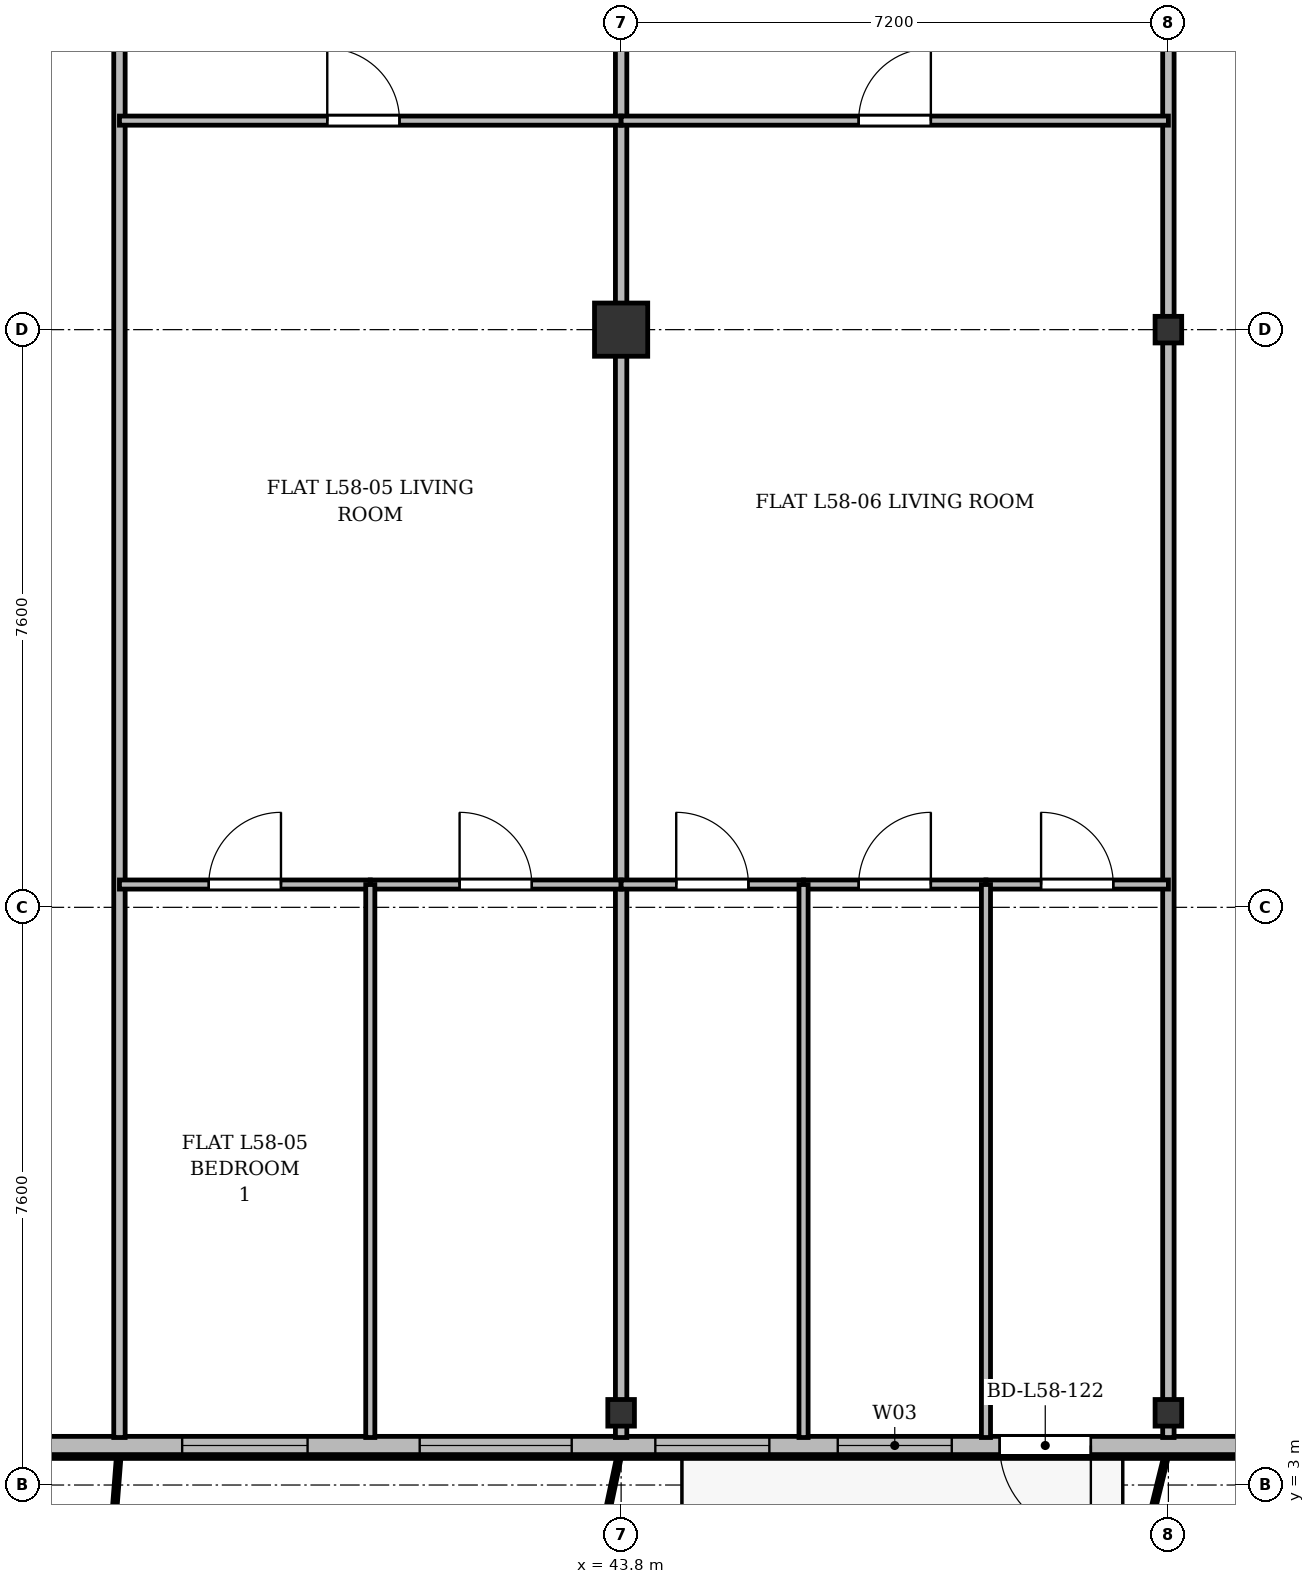
"""IFC4 building model, lengths in metres.
Left out: names, types, materials, properties, quantities, classifications, styles, units other than length and angle.
Written with IfcOpenShell. Run it as: python <this file> out.ifc"""

import sys

from ifc_helpers import new_model, si_unit, direction, frame, frame_2d, origin, origin_2d, place, context, subcontext, project, spatial, rectangle, i_section, extrude, source, transform, mapped, element, fill, save


model = new_model("IFC4")
c1 = context("Model", 3, precision=1e-05, world=origin(), true_north=direction((0.0, 1.0)))
c2 = subcontext(c1, "Body", "Model", "MODEL_VIEW")
j1 = project(units=[si_unit("LENGTHUNIT", "METRE"), si_unit("PLANEANGLEUNIT", "RADIAN")], contexts=[c1])
p1 = place(None, origin())
s1 = spatial("IfcSite", under=j1, at=p1, CompositionType="ELEMENT")
p2 = place(p1, origin())
s2 = spatial("IfcBuilding", under=s1, at=p2, CompositionType="ELEMENT")
p3 = place(p2, frame((0.0, 0.0, 222.9)))
s3 = spatial("IfcBuildingStorey", under=s2, at=p3, CompositionType="ELEMENT", Elevation=222.9)
m1 = source(origin(), c2, "Body", "SweptSolid", [
    extrude(i_section(OverallWidth=0.35, OverallDepth=0.35, WebThickness=0.018, FlangeThickness=0.028, at=origin_2d()), origin(), (0.0, 0.0, 1.0), 3.6),
])
p4 = place(p3, frame((43.8, 3.95, 0.0), z_axis=(0.0, 0.0, 1.0), x_axis=(1.0, 0.0, 0.0)))
e1 = element("IfcColumn", 1, at=p4, inside=s3, PredefinedType="COLUMN", context=c2, shape_type="MappedRepresentation", body=[
    mapped(m1, transform((0.0, 0.0, 0.0), x_axis=(1.0, 0.0, 0.0), y_axis=(0.0, 1.0, 0.0), z_axis=(0.0, 0.0, 1.0), scale=1.0)),
])
m2 = source(origin(), c2, "Body", "SweptSolid", [
    extrude(rectangle(XDim=0.7, YDim=0.7, at=origin_2d()), origin(), (0.0, 0.0, 1.0), 3.6),
])
p5 = place(p3, frame((43.8, 18.2, 0.0), z_axis=(0.0, 0.0, 1.0), x_axis=(1.0, 0.0, 0.0)))
e2 = element("IfcColumn", 2, at=p5, inside=s3, PredefinedType="COLUMN", context=c2, shape_type="MappedRepresentation", body=[
    mapped(m2, transform((0.0, 0.0, 0.0), x_axis=(1.0, 0.0, 0.0), y_axis=(0.0, 1.0, 0.0), z_axis=(0.0, 0.0, 1.0), scale=1.0)),
])
for number, where, z_axis, x_axis in (
    (3, (51.0, 3.95, 0.0), (0.0, 0.0, 1.0), (1.0, 0.0, 0.0)),
    (4, (51.0, 18.2, 0.0), (0.0, 0.0, 1.0), (1.0, 0.0, 0.0)),
):
    element("IfcColumn", number, at=place(p3, frame(where, z_axis=z_axis, x_axis=x_axis)), inside=s3, PredefinedType="COLUMN", context=c2, shape_type="MappedRepresentation", body=[
        mapped(m1, transform((0.0, 0.0, 0.0), x_axis=(1.0, 0.0, 0.0), y_axis=(0.0, 1.0, 0.0), z_axis=(0.0, 0.0, 1.0), scale=1.0)),
    ])
p6 = place(p3, frame((63.4, 3.52, 0.0), z_axis=(0.0, 0.0, 1.0), x_axis=(-1.0, 0.0, 0.0)))
e5 = element("IfcWall", 5, at=p6, inside=s3, PredefinedType="SOLIDWALL", context=c2, shape_type="SweptSolid", body=[
    extrude(rectangle(XDim=52.4, YDim=0.24, at=frame_2d((26.2, 0.0))), origin(), (0.0, 0.0, 1.0), 3.36),
])
p7 = place(p6, frame((1.345, 0.0, 0.9)))
e6 = element("IfcOpeningElement", 6, at=p7, cuts=e5, PredefinedType="OPENING", context=c2, shape_type="SweptSolid", body=[
    extrude(rectangle(XDim=2.0, YDim=1.95, at=frame_2d((1.0, 0.975))), frame((0.0, 0.13, 0.0), z_axis=(0.0, -1.0, 0.0), x_axis=(1.0, 0.0, 0.0)), (0.0, 0.0, 1.0), 0.26),
])
p8 = place(p6, frame((7.675, 0.0, 0.9)))
e7 = element("IfcOpeningElement", 7, at=p8, cuts=e5, PredefinedType="OPENING", context=c2, shape_type="SweptSolid", body=[
    extrude(rectangle(XDim=1.65, YDim=1.85, at=frame_2d((0.825, 0.925))), frame((0.0, 0.13, 0.0), z_axis=(0.0, -1.0, 0.0), x_axis=(1.0, 0.0, 0.0)), (0.0, 0.0, 1.0), 0.26),
])
p9 = place(p6, frame((13.42, 0.0, 0.0)))
e8 = element("IfcOpeningElement", 8, at=p9, cuts=e5, PredefinedType="OPENING", context=c2, shape_type="SweptSolid", body=[
    extrude(rectangle(XDim=1.2, YDim=2.2, at=frame_2d((0.6, 1.1))), frame((0.0, 0.13, 0.0), z_axis=(0.0, -1.0, 0.0), x_axis=(1.0, 0.0, 0.0)), (0.0, 0.0, 1.0), 0.26),
])
p10 = place(p6, frame((15.25, 0.0, 0.9)))
e9 = element("IfcOpeningElement", 9, at=p10, cuts=e5, PredefinedType="OPENING", context=c2, shape_type="SweptSolid", body=[
    extrude(rectangle(XDim=1.5, YDim=1.75, at=frame_2d((0.75, 0.875))), frame((0.0, 0.13, 0.0), z_axis=(0.0, -1.0, 0.0), x_axis=(1.0, 0.0, 0.0)), (0.0, 0.0, 1.0), 0.26),
])
p11 = place(p6, frame((17.65, 0.0, 0.9)))
e10 = element("IfcOpeningElement", 10, at=p11, cuts=e5, PredefinedType="OPENING", context=c2, shape_type="SweptSolid", body=[
    extrude(rectangle(XDim=1.5, YDim=1.75, at=frame_2d((0.75, 0.875))), frame((0.0, 0.13, 0.0), z_axis=(0.0, -1.0, 0.0), x_axis=(1.0, 0.0, 0.0)), (0.0, 0.0, 1.0), 0.26),
])
p12 = place(p6, frame((20.25, 0.0, 0.9)))
e11 = element("IfcOpeningElement", 11, at=p12, cuts=e5, PredefinedType="OPENING", context=c2, shape_type="SweptSolid", body=[
    extrude(rectangle(XDim=2.0, YDim=1.95, at=frame_2d((1.0, 0.975))), frame((0.0, 0.13, 0.0), z_axis=(0.0, -1.0, 0.0), x_axis=(1.0, 0.0, 0.0)), (0.0, 0.0, 1.0), 0.26),
])
p13 = place(p6, frame((23.725, 0.0, 0.9)))
e12 = element("IfcOpeningElement", 12, at=p13, cuts=e5, PredefinedType="OPENING", context=c2, shape_type="SweptSolid", body=[
    extrude(rectangle(XDim=1.65, YDim=1.85, at=frame_2d((0.825, 0.925))), frame((0.0, 0.13, 0.0), z_axis=(0.0, -1.0, 0.0), x_axis=(1.0, 0.0, 0.0)), (0.0, 0.0, 1.0), 0.26),
])
p14 = place(p6, frame((28.6, 0.0, 0.9)))
e13 = element("IfcOpeningElement", 13, at=p14, cuts=e5, PredefinedType="OPENING", context=c2, shape_type="SweptSolid", body=[
    extrude(rectangle(XDim=1.8, YDim=1.8, at=frame_2d((0.9, 0.9))), frame((0.0, 0.13, 0.0), z_axis=(0.0, -1.0, 0.0), x_axis=(1.0, 0.0, 0.0)), (0.0, 0.0, 1.0), 0.26),
])
p15 = place(p6, frame((33.5, 0.0, 0.9)))
e14 = element("IfcOpeningElement", 14, at=p15, cuts=e5, PredefinedType="OPENING", context=c2, shape_type="SweptSolid", body=[
    extrude(rectangle(XDim=2.2, YDim=1.8, at=frame_2d((1.1, 0.9))), frame((0.0, 0.13, 0.0), z_axis=(0.0, -1.0, 0.0), x_axis=(1.0, 0.0, 0.0)), (0.0, 0.0, 1.0), 0.26),
])
p16 = place(p6, frame((37.45, 0.0, 0.9)))
e15 = element("IfcOpeningElement", 15, at=p16, cuts=e5, PredefinedType="OPENING", context=c2, shape_type="SweptSolid", body=[
    extrude(rectangle(XDim=1.5, YDim=1.75, at=frame_2d((0.75, 0.875))), frame((0.0, 0.13, 0.0), z_axis=(0.0, -1.0, 0.0), x_axis=(1.0, 0.0, 0.0)), (0.0, 0.0, 1.0), 0.26),
])
p17 = place(p6, frame((41.09, 0.0, 0.0)))
e16 = element("IfcOpeningElement", 16, at=p17, cuts=e5, PredefinedType="OPENING", context=c2, shape_type="SweptSolid", body=[
    extrude(rectangle(XDim=1.2, YDim=2.2, at=frame_2d((0.6, 1.1))), frame((0.0, 0.13, 0.0), z_axis=(0.0, -1.0, 0.0), x_axis=(1.0, 0.0, 0.0)), (0.0, 0.0, 1.0), 0.26),
])
p18 = place(p6, frame((43.075, 0.0, 0.9)))
e17 = element("IfcOpeningElement", 17, at=p18, cuts=e5, PredefinedType="OPENING", context=c2, shape_type="SweptSolid", body=[
    extrude(rectangle(XDim=1.65, YDim=1.85, at=frame_2d((0.825, 0.925))), frame((0.0, 0.13, 0.0), z_axis=(0.0, -1.0, 0.0), x_axis=(1.0, 0.0, 0.0)), (0.0, 0.0, 1.0), 0.26),
])
p19 = place(p6, frame((45.6, 0.0, 0.9)))
e18 = element("IfcOpeningElement", 18, at=p19, cuts=e5, PredefinedType="OPENING", context=c2, shape_type="SweptSolid", body=[
    extrude(rectangle(XDim=1.8, YDim=1.8, at=frame_2d((0.9, 0.9))), frame((0.0, 0.13, 0.0), z_axis=(0.0, -1.0, 0.0), x_axis=(1.0, 0.0, 0.0)), (0.0, 0.0, 1.0), 0.26),
])
p20 = place(p6, frame((48.955, 0.0, 0.9)))
e19 = element("IfcOpeningElement", 19, at=p20, cuts=e5, PredefinedType="OPENING", context=c2, shape_type="SweptSolid", body=[
    extrude(rectangle(XDim=2.2, YDim=1.8, at=frame_2d((1.1, 0.9))), frame((0.0, 0.13, 0.0), z_axis=(0.0, -1.0, 0.0), x_axis=(1.0, 0.0, 0.0)), (0.0, 0.0, 1.0), 0.26),
])
p21 = place(p3, frame((37.2, 3.625, 0.0), z_axis=(0.0, 0.0, 1.0), x_axis=(0.0, 1.0, 0.0)))
e20 = element("IfcWall", 20, at=p21, inside=s3, PredefinedType="PARTITIONING", context=c2, shape_type="SweptSolid", body=[
    extrude(rectangle(XDim=27.375, YDim=0.15, at=frame_2d((13.688, 0.0))), origin(), (0.0, 0.0, 1.0), 2.91),
])
for number, where, z_axis, x_axis in (
    (21, (43.8, 3.625, 0.0), (0.0, 0.0, 1.0), (0.0, 1.0, 0.0)),
    (22, (51.0, 3.625, 0.0), (0.0, 0.0, 1.0), (0.0, 1.0, 0.0)),
):
    element("IfcWall", number, at=place(p3, frame(where, z_axis=z_axis, x_axis=x_axis)), inside=s3, PredefinedType="PARTITIONING", context=c2, shape_type="SweptSolid", body=[
        extrude(rectangle(XDim=27.375, YDim=0.15, at=frame_2d((13.688, 0.0))), origin(), (0.0, 0.0, 1.0), 2.86),
    ])
p22 = place(p3, frame((37.2, 20.95, 0.0), z_axis=(0.0, 0.0, 1.0), x_axis=(1.0, 0.0, 0.0)))
e23 = element("IfcWall", 23, at=p22, inside=s3, PredefinedType="PARTITIONING", context=c2, shape_type="SweptSolid", body=[
    extrude(rectangle(XDim=6.6, YDim=0.12, at=frame_2d((3.3, 0.0))), origin(), (0.0, 0.0, 1.0), 2.86),
])
p23 = place(p22, frame((2.734, 0.0, 0.0)))
e24 = element("IfcOpeningElement", 24, at=p23, cuts=e23, PredefinedType="OPENING", context=c2, shape_type="SweptSolid", body=[
    extrude(rectangle(XDim=0.95, YDim=2.15, at=frame_2d((0.475, 1.075))), frame((0.0, 0.07, 0.0), z_axis=(0.0, -1.0, 0.0), x_axis=(1.0, 0.0, 0.0)), (0.0, 0.0, 1.0), 0.14),
])
p24 = place(p3, frame((37.2, 10.9, 0.0), z_axis=(0.0, 0.0, 1.0), x_axis=(1.0, 0.0, 0.0)))
e25 = element("IfcWall", 25, at=p24, inside=s3, PredefinedType="PARTITIONING", context=c2, shape_type="SweptSolid", body=[
    extrude(rectangle(XDim=3.3, YDim=0.12, at=frame_2d((1.65, 0.0))), origin(), (0.0, 0.0, 1.0), 3.06),
])
p25 = place(p24, frame((1.175, 0.0, 0.0)))
e26 = element("IfcOpeningElement", 26, at=p25, cuts=e25, PredefinedType="OPENING", context=c2, shape_type="SweptSolid", body=[
    extrude(rectangle(XDim=0.95, YDim=2.15, at=frame_2d((0.475, 1.075))), frame((0.0, 0.07, 0.0), z_axis=(0.0, -1.0, 0.0), x_axis=(1.0, 0.0, 0.0)), (0.0, 0.0, 1.0), 0.14),
])
p26 = place(p3, frame((40.5, 10.9, 0.0), z_axis=(0.0, 0.0, 1.0), x_axis=(1.0, 0.0, 0.0)))
e27 = element("IfcWall", 27, at=p26, inside=s3, PredefinedType="PARTITIONING", context=c2, shape_type="SweptSolid", body=[
    extrude(rectangle(XDim=3.3, YDim=0.12, at=frame_2d((1.65, 0.0))), origin(), (0.0, 0.0, 1.0), 2.86),
])
p27 = place(p26, frame((1.175, 0.0, 0.0)))
e28 = element("IfcOpeningElement", 28, at=p27, cuts=e27, PredefinedType="OPENING", context=c2, shape_type="SweptSolid", body=[
    extrude(rectangle(XDim=0.95, YDim=2.15, at=frame_2d((0.475, 1.075))), frame((0.0, 0.07, 0.0), z_axis=(0.0, -1.0, 0.0), x_axis=(1.0, 0.0, 0.0)), (0.0, 0.0, 1.0), 0.14),
])
p28 = place(p3, frame((40.5, 3.625, 0.0), z_axis=(0.0, 0.0, 1.0), x_axis=(0.0, 1.0, 0.0)))
e29 = element("IfcWall", 29, at=p28, inside=s3, PredefinedType="PARTITIONING", context=c2, shape_type="SweptSolid", body=[
    extrude(rectangle(XDim=7.275, YDim=0.12, at=frame_2d((3.637, 0.0))), origin(), (0.0, 0.0, 1.0), 2.91),
])
p29 = place(p3, frame((43.8, 20.95, 0.0), z_axis=(0.0, 0.0, 1.0), x_axis=(1.0, 0.0, 0.0)))
e30 = element("IfcWall", 30, at=p29, inside=s3, PredefinedType="PARTITIONING", context=c2, shape_type="SweptSolid", body=[
    extrude(rectangle(XDim=7.2, YDim=0.12, at=frame_2d((3.6, 0.0))), origin(), (0.0, 0.0, 1.0), 2.86),
])
p30 = place(p29, frame((3.125, 0.0, 0.0)))
e31 = element("IfcOpeningElement", 31, at=p30, cuts=e30, PredefinedType="OPENING", context=c2, shape_type="SweptSolid", body=[
    extrude(rectangle(XDim=0.95, YDim=2.15, at=frame_2d((0.475, 1.075))), frame((0.0, 0.07, 0.0), z_axis=(0.0, -1.0, 0.0), x_axis=(1.0, 0.0, 0.0)), (0.0, 0.0, 1.0), 0.14),
])
p31 = place(p3, frame((43.8, 10.9, 0.0), z_axis=(0.0, 0.0, 1.0), x_axis=(1.0, 0.0, 0.0)))
e32 = element("IfcWall", 32, at=p31, inside=s3, PredefinedType="PARTITIONING", context=c2, shape_type="SweptSolid", body=[
    extrude(rectangle(XDim=2.4, YDim=0.12, at=frame_2d((1.2, 0.0))), origin(), (0.0, 0.0, 1.0), 2.86),
])
p32 = place(p31, frame((0.725, 0.0, 0.0)))
e33 = element("IfcOpeningElement", 33, at=p32, cuts=e32, PredefinedType="OPENING", context=c2, shape_type="SweptSolid", body=[
    extrude(rectangle(XDim=0.95, YDim=2.15, at=frame_2d((0.475, 1.075))), frame((0.0, 0.07, 0.0), z_axis=(0.0, -1.0, 0.0), x_axis=(1.0, 0.0, 0.0)), (0.0, 0.0, 1.0), 0.14),
])
p33 = place(p3, frame((46.2, 10.9, 0.0), z_axis=(0.0, 0.0, 1.0), x_axis=(1.0, 0.0, 0.0)))
e34 = element("IfcWall", 34, at=p33, inside=s3, PredefinedType="PARTITIONING", context=c2, shape_type="SweptSolid", body=[
    extrude(rectangle(XDim=2.4, YDim=0.12, at=frame_2d((1.2, 0.0))), origin(), (0.0, 0.0, 1.0), 3.06),
])
p34 = place(p33, frame((0.725, 0.0, 0.0)))
e35 = element("IfcOpeningElement", 35, at=p34, cuts=e34, PredefinedType="OPENING", context=c2, shape_type="SweptSolid", body=[
    extrude(rectangle(XDim=0.95, YDim=2.15, at=frame_2d((0.475, 1.075))), frame((0.0, 0.07, 0.0), z_axis=(0.0, -1.0, 0.0), x_axis=(1.0, 0.0, 0.0)), (0.0, 0.0, 1.0), 0.14),
])
p35 = place(p3, frame((46.2, 3.625, 0.0), z_axis=(0.0, 0.0, 1.0), x_axis=(0.0, 1.0, 0.0)))
e36 = element("IfcWall", 36, at=p35, inside=s3, PredefinedType="PARTITIONING", context=c2, shape_type="SweptSolid", body=[
    extrude(rectangle(XDim=7.275, YDim=0.12, at=frame_2d((3.637, 0.0))), origin(), (0.0, 0.0, 1.0), 2.91),
])
p36 = place(p3, frame((48.6, 10.9, 0.0), z_axis=(0.0, 0.0, 1.0), x_axis=(1.0, 0.0, 0.0)))
e37 = element("IfcWall", 37, at=p36, inside=s3, PredefinedType="PARTITIONING", context=c2, shape_type="SweptSolid", body=[
    extrude(rectangle(XDim=2.4, YDim=0.12, at=frame_2d((1.2, 0.0))), origin(), (0.0, 0.0, 1.0), 2.86),
])
p37 = place(p36, frame((0.725, 0.0, 0.0)))
e38 = element("IfcOpeningElement", 38, at=p37, cuts=e37, PredefinedType="OPENING", context=c2, shape_type="SweptSolid", body=[
    extrude(rectangle(XDim=0.95, YDim=2.15, at=frame_2d((0.475, 1.075))), frame((0.0, 0.07, 0.0), z_axis=(0.0, -1.0, 0.0), x_axis=(1.0, 0.0, 0.0)), (0.0, 0.0, 1.0), 0.14),
])
p38 = place(p3, frame((48.6, 3.625, 0.0), z_axis=(0.0, 0.0, 1.0), x_axis=(0.0, 1.0, 0.0)))
e39 = element("IfcWall", 39, at=p38, inside=s3, PredefinedType="PARTITIONING", context=c2, shape_type="SweptSolid", body=[
    extrude(rectangle(XDim=7.275, YDim=0.12, at=frame_2d((3.637, 0.0))), origin(), (0.0, 0.0, 1.0), 2.91),
])
m3 = source(origin(), c2, "Body", "SweptSolid", [
    extrude(rectangle(XDim=1.2, YDim=2.2, at=frame_2d((0.6, 1.1))), frame((0.0, 0.025, 0.0), z_axis=(0.0, -1.0, 0.0), x_axis=(1.0, 0.0, 0.0)), (0.0, 0.0, 1.0), 0.05),
])
p39 = place(p9, origin())
e40 = element("IfcDoor", 40, at=p39, inside=s3, OperationType="SINGLE_SWING_LEFT", PredefinedType="DOOR", context=c2, shape_type="MappedRepresentation", body=[
    mapped(m3, transform((0.0, 0.0, 0.0), x_axis=(1.0, 0.0, 0.0), y_axis=(0.0, 1.0, 0.0), z_axis=(0.0, 0.0, 1.0), scale=1.0)),
])
fill(e8, e40)
m4 = source(origin(), c2, "Body", "SweptSolid", [
    extrude(rectangle(XDim=1.5, YDim=1.75, at=frame_2d((0.75, 0.875))), frame((0.0, 0.03, 0.0), z_axis=(0.0, -1.0, 0.0), x_axis=(1.0, 0.0, 0.0)), (0.0, 0.0, 1.0), 0.06),
])
p40 = place(p10, origin())
e41 = element("IfcWindow", 41, at=p40, inside=s3, PartitioningType="SINGLE_PANEL", PredefinedType="WINDOW", context=c2, shape_type="MappedRepresentation", body=[
    mapped(m4, transform((0.0, 0.0, 0.0), x_axis=(1.0, 0.0, 0.0), y_axis=(0.0, 1.0, 0.0), z_axis=(0.0, 0.0, 1.0), scale=1.0)),
])
fill(e9, e41)
p41 = place(p11, origin())
e42 = element("IfcWindow", 42, at=p41, inside=s3, PartitioningType="SINGLE_PANEL", PredefinedType="WINDOW", context=c2, shape_type="MappedRepresentation", body=[
    mapped(m4, transform((0.0, 0.0, 0.0), x_axis=(1.0, 0.0, 0.0), y_axis=(0.0, 1.0, 0.0), z_axis=(0.0, 0.0, 1.0), scale=1.0)),
])
fill(e10, e42)
m5 = source(origin(), c2, "Body", "SweptSolid", [
    extrude(rectangle(XDim=2.0, YDim=1.95, at=frame_2d((1.0, 0.975))), frame((0.0, 0.03, 0.0), z_axis=(0.0, -1.0, 0.0), x_axis=(1.0, 0.0, 0.0)), (0.0, 0.0, 1.0), 0.06),
])
p42 = place(p12, origin())
e43 = element("IfcWindow", 43, at=p42, inside=s3, PartitioningType="SINGLE_PANEL", PredefinedType="WINDOW", context=c2, shape_type="MappedRepresentation", body=[
    mapped(m5, transform((0.0, 0.0, 0.0), x_axis=(1.0, 0.0, 0.0), y_axis=(0.0, 1.0, 0.0), z_axis=(0.0, 0.0, 1.0), scale=1.0)),
])
fill(e11, e43)
m6 = source(origin(), c2, "Body", "SweptSolid", [
    extrude(rectangle(XDim=1.65, YDim=1.85, at=frame_2d((0.825, 0.925))), frame((0.0, 0.03, 0.0), z_axis=(0.0, -1.0, 0.0), x_axis=(1.0, 0.0, 0.0)), (0.0, 0.0, 1.0), 0.06),
])
p43 = place(p13, origin())
e44 = element("IfcWindow", 44, at=p43, inside=s3, PartitioningType="SINGLE_PANEL", PredefinedType="WINDOW", context=c2, shape_type="MappedRepresentation", body=[
    mapped(m6, transform((0.0, 0.0, 0.0), x_axis=(1.0, 0.0, 0.0), y_axis=(0.0, 1.0, 0.0), z_axis=(0.0, 0.0, 1.0), scale=1.0)),
])
fill(e12, e44)
m7 = source(origin(), c2, "Body", "SweptSolid", [
    extrude(rectangle(XDim=0.95, YDim=2.15, at=frame_2d((0.475, 1.075))), frame((0.0, 0.025, 0.0), z_axis=(0.0, -1.0, 0.0), x_axis=(1.0, 0.0, 0.0)), (0.0, 0.0, 1.0), 0.05),
])
p44 = place(p23, origin())
e45 = element("IfcDoor", 45, at=p44, inside=s3, OperationType="SINGLE_SWING_LEFT", PredefinedType="DOOR", context=c2, shape_type="MappedRepresentation", body=[
    mapped(m7, transform((0.0, 0.0, 0.0), x_axis=(1.0, 0.0, 0.0), y_axis=(0.0, 1.0, 0.0), z_axis=(0.0, 0.0, 1.0), scale=1.0)),
])
fill(e24, e45)
p45 = place(p25, origin())
e46 = element("IfcDoor", 46, at=p45, inside=s3, OperationType="SINGLE_SWING_RIGHT", PredefinedType="DOOR", context=c2, shape_type="MappedRepresentation", body=[
    mapped(m7, transform((0.0, 0.0, 0.0), x_axis=(1.0, 0.0, 0.0), y_axis=(0.0, 1.0, 0.0), z_axis=(0.0, 0.0, 1.0), scale=1.0)),
])
fill(e26, e46)
p46 = place(p27, origin())
e47 = element("IfcDoor", 47, at=p46, inside=s3, OperationType="SINGLE_SWING_LEFT", PredefinedType="DOOR", context=c2, shape_type="MappedRepresentation", body=[
    mapped(m7, transform((0.0, 0.0, 0.0), x_axis=(1.0, 0.0, 0.0), y_axis=(0.0, 1.0, 0.0), z_axis=(0.0, 0.0, 1.0), scale=1.0)),
])
fill(e28, e47)
p47 = place(p30, origin())
e48 = element("IfcDoor", 48, at=p47, inside=s3, OperationType="SINGLE_SWING_RIGHT", PredefinedType="DOOR", context=c2, shape_type="MappedRepresentation", body=[
    mapped(m7, transform((0.0, 0.0, 0.0), x_axis=(1.0, 0.0, 0.0), y_axis=(0.0, 1.0, 0.0), z_axis=(0.0, 0.0, 1.0), scale=1.0)),
])
fill(e31, e48)
p48 = place(p32, origin())
e49 = element("IfcDoor", 49, at=p48, inside=s3, OperationType="SINGLE_SWING_LEFT", PredefinedType="DOOR", context=c2, shape_type="MappedRepresentation", body=[
    mapped(m7, transform((0.0, 0.0, 0.0), x_axis=(1.0, 0.0, 0.0), y_axis=(0.0, 1.0, 0.0), z_axis=(0.0, 0.0, 1.0), scale=1.0)),
])
fill(e33, e49)
p49 = place(p34, origin())
e50 = element("IfcDoor", 50, at=p49, inside=s3, OperationType="SINGLE_SWING_RIGHT", PredefinedType="DOOR", context=c2, shape_type="MappedRepresentation", body=[
    mapped(m7, transform((0.0, 0.0, 0.0), x_axis=(1.0, 0.0, 0.0), y_axis=(0.0, 1.0, 0.0), z_axis=(0.0, 0.0, 1.0), scale=1.0)),
])
fill(e35, e50)
p50 = place(p37, origin())
e51 = element("IfcDoor", 51, at=p50, inside=s3, OperationType="SINGLE_SWING_LEFT", PredefinedType="DOOR", context=c2, shape_type="MappedRepresentation", body=[
    mapped(m7, transform((0.0, 0.0, 0.0), x_axis=(1.0, 0.0, 0.0), y_axis=(0.0, 1.0, 0.0), z_axis=(0.0, 0.0, 1.0), scale=1.0)),
])
fill(e38, e51)
save(model, sys.argv[1])
